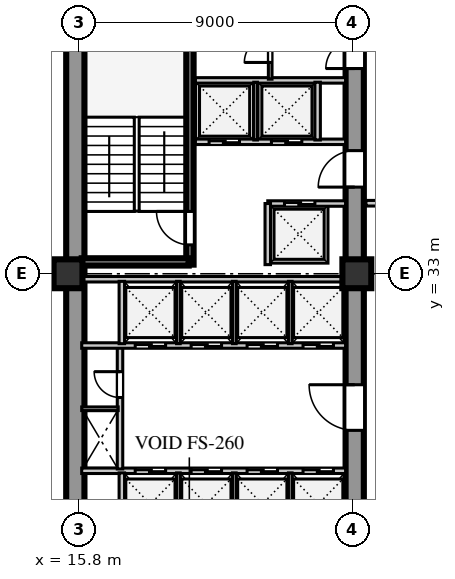
"""IFC4 building model, lengths in metres.
Left out: names, types, materials, properties, quantities, classifications, styles, units other than length and angle.
Written with IfcOpenShell. Run it as: python <this file> out.ifc"""

import sys

from ifc_helpers import new_model, si_unit, direction, frame, frame_2d, origin, origin_2d, place, context, subcontext, project, spatial, rectangle, extrude, element, fill, save


model = new_model("IFC4")
c1 = context("Model", 3, precision=1e-05, world=origin(), true_north=direction((0.0, 1.0)))
c2 = subcontext(c1, "Body", "Model", "MODEL_VIEW")
j1 = project(units=[si_unit("LENGTHUNIT", "METRE"), si_unit("PLANEANGLEUNIT", "RADIAN")], contexts=[c1])
p1 = place(None, origin())
s1 = spatial("IfcSite", under=j1, at=p1, CompositionType="ELEMENT")
p2 = place(p1, origin())
s2 = spatial("IfcBuilding", under=s1, at=p2, CompositionType="ELEMENT")
p3 = place(p2, frame((0.0, 0.0, 82.0)))
s3 = spatial("IfcBuildingStorey", under=s2, at=p3, CompositionType="ELEMENT", Elevation=82.0)
p4 = place(p3, frame((15.69, 15.81, 0.0), z_axis=(0.0, 0.0, 1.0), x_axis=(0.0, 1.0, 0.0)))
e1 = element("IfcWall", 1, at=p4, inside=s3, PredefinedType="SHEAR", context=c2, shape_type="SweptSolid", body=[
    extrude(rectangle(XDim=25.63, YDim=0.6, at=frame_2d((12.815, 0.0))), origin(), (0.0, 0.0, 1.0), 3.74),
])
p5 = place(p3, frame((24.88, 15.74, 0.0), z_axis=(0.0, 0.0, 1.0), x_axis=(0.0, 1.0, 0.0)))
e2 = element("IfcWall", 2, at=p5, inside=s3, PredefinedType="SHEAR", context=c2, shape_type="SweptSolid", body=[
    extrude(rectangle(XDim=25.76, YDim=0.6, at=frame_2d((12.88, 0.0))), origin(), (0.0, 0.0, 1.0), 3.74),
])
p6 = place(p5, frame((1.61, 0.0, 0.0)))
e3 = element("IfcOpeningElement", 3, at=p6, cuts=e2, PredefinedType="OPENING", context=c2, shape_type="SweptSolid", body=[
    extrude(rectangle(XDim=1.2, YDim=2.1, at=frame_2d((0.6, 1.05))), frame((0.0, 0.31, 0.0), z_axis=(0.0, -1.0, 0.0), x_axis=(1.0, 0.0, 0.0)), (0.0, 0.0, 1.0), 0.62),
])
p7 = place(p5, frame((6.78, 0.0, 0.0)))
e4 = element("IfcOpeningElement", 4, at=p7, cuts=e2, PredefinedType="OPENING", context=c2, shape_type="SweptSolid", body=[
    extrude(rectangle(XDim=0.85, YDim=2.06, at=frame_2d((0.425, 1.03))), frame((0.0, 0.31, 0.0), z_axis=(0.0, -1.0, 0.0), x_axis=(1.0, 0.0, 0.0)), (0.0, 0.0, 1.0), 0.62),
])
p8 = place(p5, frame((12.11, 0.0, 0.0)))
e5 = element("IfcOpeningElement", 5, at=p8, cuts=e2, PredefinedType="OPENING", context=c2, shape_type="SweptSolid", body=[
    extrude(rectangle(XDim=1.5, YDim=2.12, at=frame_2d((0.75, 1.06))), frame((0.0, 0.31, 0.0), z_axis=(0.0, -1.0, 0.0), x_axis=(1.0, 0.0, 0.0)), (0.0, 0.0, 1.0), 0.62),
])
p9 = place(p5, frame((20.11, 0.0, 0.0)))
e6 = element("IfcOpeningElement", 6, at=p9, cuts=e2, PredefinedType="OPENING", context=c2, shape_type="SweptSolid", body=[
    extrude(rectangle(XDim=1.2, YDim=2.12, at=frame_2d((0.6, 1.06))), frame((0.0, 0.31, 0.0), z_axis=(0.0, -1.0, 0.0), x_axis=(1.0, 0.0, 0.0)), (0.0, 0.0, 1.0), 0.62),
])
p10 = place(p5, frame((24.01, 0.0, 0.0)))
e7 = element("IfcOpeningElement", 7, at=p10, cuts=e2, PredefinedType="OPENING", context=c2, shape_type="SweptSolid", body=[
    extrude(rectangle(XDim=0.95, YDim=2.1, at=frame_2d((0.475, 1.05))), frame((0.0, 0.31, 0.0), z_axis=(0.0, -1.0, 0.0), x_axis=(1.0, 0.0, 0.0)), (0.0, 0.0, 1.0), 0.62),
])
for number, where, z_axis, x_axis in (
    (8, (15.45, 33.0, 0.0), (0.0, 0.0, 1.0), (1.0, 0.0, 0.0)),
    (9, (24.95, 33.0, 0.0), (0.0, 0.0, 1.0), (1.0, 0.0, 0.0)),
):
    element("IfcColumn", number, at=place(p3, frame(where, z_axis=z_axis, x_axis=x_axis)), inside=s3, PredefinedType="COLUMN", context=c2, shape_type="SweptSolid", body=[
        extrude(rectangle(XDim=0.95, YDim=0.95, at=origin_2d()), origin(), (0.0, 0.0, 1.0), 3.74),
    ])
p11 = place(p3, frame((15.9, 26.52, 0.0), z_axis=(0.0, 0.0, 1.0), x_axis=(1.0, 0.0, 0.0)))
e10 = element("IfcWall", 10, at=p11, inside=s3, PredefinedType="SOLIDWALL", context=c2, shape_type="SweptSolid", body=[
    extrude(rectangle(XDim=8.68, YDim=0.18, at=frame_2d((4.34, 0.0))), origin(), (0.0, 0.0, 1.0), 3.74),
])
p12 = place(p11, frame((1.76, 0.0, 0.0)))
e11 = element("IfcOpeningElement", 11, at=p12, cuts=e10, PredefinedType="OPENING", context=c2, shape_type="SweptSolid", body=[
    extrude(rectangle(XDim=1.0, YDim=2.1, at=frame_2d((0.5, 1.05))), frame((0.0, 0.1, 0.0), z_axis=(0.0, -1.0, 0.0), x_axis=(1.0, 0.0, 0.0)), (0.0, 0.0, 1.0), 0.2),
])
p13 = place(p11, frame((3.6, 0.0, 0.0)))
e12 = element("IfcOpeningElement", 12, at=p13, cuts=e10, PredefinedType="OPENING", context=c2, shape_type="SweptSolid", body=[
    extrude(rectangle(XDim=1.0, YDim=2.1, at=frame_2d((0.5, 1.05))), frame((0.0, 0.1, 0.0), z_axis=(0.0, -1.0, 0.0), x_axis=(1.0, 0.0, 0.0)), (0.0, 0.0, 1.0), 0.2),
])
p14 = place(p11, frame((5.44, 0.0, 0.0)))
e13 = element("IfcOpeningElement", 13, at=p14, cuts=e10, PredefinedType="OPENING", context=c2, shape_type="SweptSolid", body=[
    extrude(rectangle(XDim=1.0, YDim=2.1, at=frame_2d((0.5, 1.05))), frame((0.0, 0.1, 0.0), z_axis=(0.0, -1.0, 0.0), x_axis=(1.0, 0.0, 0.0)), (0.0, 0.0, 1.0), 0.2),
])
p15 = place(p11, frame((7.28, 0.0, 0.0)))
e14 = element("IfcOpeningElement", 14, at=p15, cuts=e10, PredefinedType="OPENING", context=c2, shape_type="SweptSolid", body=[
    extrude(rectangle(XDim=1.0, YDim=2.1, at=frame_2d((0.5, 1.05))), frame((0.0, 0.1, 0.0), z_axis=(0.0, -1.0, 0.0), x_axis=(1.0, 0.0, 0.0)), (0.0, 0.0, 1.0), 0.2),
])
p16 = place(p3, frame((17.22, 24.4, 0.0), z_axis=(0.0, 0.0, 1.0), x_axis=(0.0, 1.0, 0.0)))
e15 = element("IfcWall", 15, at=p16, inside=s3, PredefinedType="SOLIDWALL", context=c2, shape_type="SweptSolid", body=[
    extrude(rectangle(XDim=2.05, YDim=0.18, at=frame_2d((1.025, 0.0))), origin(), (0.0, 0.0, 1.0), 3.74),
])
for number, where, z_axis, x_axis in (
    (16, (19.08, 24.4, 0.0), (0.0, 0.0, 1.0), (0.0, 1.0, 0.0)),
    (17, (20.92, 24.4, 0.0), (0.0, 0.0, 1.0), (0.0, 1.0, 0.0)),
    (18, (22.76, 24.4, 0.0), (0.0, 0.0, 1.0), (0.0, 1.0, 0.0)),
):
    element("IfcWall", number, at=place(p3, frame(where, z_axis=z_axis, x_axis=x_axis)), inside=s3, PredefinedType="PARTITIONING", context=c2, shape_type="SweptSolid", body=[
        extrude(rectangle(XDim=2.05, YDim=0.12, at=frame_2d((1.025, 0.0))), origin(), (0.0, 0.0, 1.0), 3.74),
    ])
p17 = place(p3, frame((17.16, 26.58, 0.0), z_axis=(0.0, 0.0, 1.0), x_axis=(0.0, 1.0, 0.0)))
e19 = element("IfcWall", 19, at=p17, inside=s3, PredefinedType="SOLIDWALL", context=c2, shape_type="SweptSolid", body=[
    extrude(rectangle(XDim=4.02, YDim=0.18, at=frame_2d((2.01, 0.0))), origin(), (0.0, 0.0, 1.0), 3.74),
])
p18 = place(p17, frame((2.35, 0.0, 0.0)))
e20 = element("IfcOpeningElement", 20, at=p18, cuts=e19, PredefinedType="OPENING", context=c2, shape_type="SweptSolid", body=[
    extrude(rectangle(XDim=0.85, YDim=2.06, at=frame_2d((0.425, 1.03))), frame((0.0, 0.1, 0.0), z_axis=(0.0, -1.0, 0.0), x_axis=(1.0, 0.0, 0.0)), (0.0, 0.0, 1.0), 0.2),
])
p19 = place(p3, frame((15.9, 28.56, 0.0), z_axis=(0.0, 0.0, 1.0), x_axis=(1.0, 0.0, 0.0)))
e21 = element("IfcWall", 21, at=p19, inside=s3, PredefinedType="PARTITIONING", context=c2, shape_type="SweptSolid", body=[
    extrude(rectangle(XDim=1.2, YDim=0.12, at=frame_2d((0.6, 0.0))), origin(), (0.0, 0.0, 1.0), 3.74),
])
p20 = place(p3, frame((15.9, 30.64, 0.0), z_axis=(0.0, 0.0, 1.0), x_axis=(1.0, 0.0, 0.0)))
e22 = element("IfcWall", 22, at=p20, inside=s3, PredefinedType="SOLIDWALL", context=c2, shape_type="SweptSolid", body=[
    extrude(rectangle(XDim=8.68, YDim=0.18, at=frame_2d((4.34, 0.0))), origin(), (0.0, 0.0, 1.0), 3.74),
])
p21 = place(p20, frame((1.76, 0.0, 0.0)))
e23 = element("IfcOpeningElement", 23, at=p21, cuts=e22, PredefinedType="OPENING", context=c2, shape_type="SweptSolid", body=[
    extrude(rectangle(XDim=1.0, YDim=2.1, at=frame_2d((0.5, 1.05))), frame((0.0, 0.1, 0.0), z_axis=(0.0, -1.0, 0.0), x_axis=(1.0, 0.0, 0.0)), (0.0, 0.0, 1.0), 0.2),
])
p22 = place(p20, frame((3.6, 0.0, 0.0)))
e24 = element("IfcOpeningElement", 24, at=p22, cuts=e22, PredefinedType="OPENING", context=c2, shape_type="SweptSolid", body=[
    extrude(rectangle(XDim=1.0, YDim=2.1, at=frame_2d((0.5, 1.05))), frame((0.0, 0.1, 0.0), z_axis=(0.0, -1.0, 0.0), x_axis=(1.0, 0.0, 0.0)), (0.0, 0.0, 1.0), 0.2),
])
p23 = place(p20, frame((5.44, 0.0, 0.0)))
e25 = element("IfcOpeningElement", 25, at=p23, cuts=e22, PredefinedType="OPENING", context=c2, shape_type="SweptSolid", body=[
    extrude(rectangle(XDim=1.0, YDim=2.1, at=frame_2d((0.5, 1.05))), frame((0.0, 0.1, 0.0), z_axis=(0.0, -1.0, 0.0), x_axis=(1.0, 0.0, 0.0)), (0.0, 0.0, 1.0), 0.2),
])
p24 = place(p20, frame((7.28, 0.0, 0.0)))
e26 = element("IfcOpeningElement", 26, at=p24, cuts=e22, PredefinedType="OPENING", context=c2, shape_type="SweptSolid", body=[
    extrude(rectangle(XDim=1.0, YDim=2.1, at=frame_2d((0.5, 1.05))), frame((0.0, 0.1, 0.0), z_axis=(0.0, -1.0, 0.0), x_axis=(1.0, 0.0, 0.0)), (0.0, 0.0, 1.0), 0.2),
])
p25 = place(p3, frame((15.9, 32.82, 0.0), z_axis=(0.0, 0.0, 1.0), x_axis=(1.0, 0.0, 0.0)))
e27 = element("IfcWall", 27, at=p25, inside=s3, PredefinedType="SOLIDWALL", context=c2, shape_type="SweptSolid", body=[
    extrude(rectangle(XDim=8.68, YDim=0.18, at=frame_2d((4.34, 0.0))), origin(), (0.0, 0.0, 1.0), 3.04),
])
p26 = place(p3, frame((17.22, 30.7, 0.0), z_axis=(0.0, 0.0, 1.0), x_axis=(0.0, 1.0, 0.0)))
e28 = element("IfcWall", 28, at=p26, inside=s3, PredefinedType="SOLIDWALL", context=c2, shape_type="SweptSolid", body=[
    extrude(rectangle(XDim=2.05, YDim=0.18, at=frame_2d((1.025, 0.0))), origin(), (0.0, 0.0, 1.0), 3.74),
])
for number, where, z_axis, x_axis in (
    (29, (19.08, 30.7, 0.0), (0.0, 0.0, 1.0), (0.0, 1.0, 0.0)),
    (30, (20.92, 30.7, 0.0), (0.0, 0.0, 1.0), (0.0, 1.0, 0.0)),
    (31, (22.76, 30.7, 0.0), (0.0, 0.0, 1.0), (0.0, 1.0, 0.0)),
):
    element("IfcWall", number, at=place(p3, frame(where, z_axis=z_axis, x_axis=x_axis)), inside=s3, PredefinedType="PARTITIONING", context=c2, shape_type="SweptSolid", body=[
        extrude(rectangle(XDim=2.05, YDim=0.12, at=frame_2d((1.025, 0.0))), origin(), (0.0, 0.0, 1.0), 3.74),
    ])
p27 = place(p3, frame((19.46, 33.3, 0.0), z_axis=(0.0, 0.0, 1.0), x_axis=(0.0, 1.0, 0.0)))
e32 = element("IfcWall", 32, at=p27, inside=s3, PredefinedType="SHEAR", context=c2, shape_type="SweptSolid", body=[
    extrude(rectangle(XDim=8.18, YDim=0.24, at=frame_2d((4.09, 0.0))), origin(), (0.0, 0.0, 1.0), 4.0),
])
p28 = place(p27, frame((0.65, 0.0, 0.0)))
e33 = element("IfcOpeningElement", 33, at=p28, cuts=e32, PredefinedType="OPENING", context=c2, shape_type="SweptSolid", body=[
    extrude(rectangle(XDim=1.1, YDim=2.1, at=frame_2d((0.55, 1.05))), frame((0.0, 0.13, 0.0), z_axis=(0.0, -1.0, 0.0), x_axis=(1.0, 0.0, 0.0)), (0.0, 0.0, 1.0), 0.26),
])
p29 = place(p3, frame((15.9, 33.39, 0.0), z_axis=(0.0, 0.0, 1.0), x_axis=(1.0, 0.0, 0.0)))
e34 = element("IfcWall", 34, at=p29, inside=s3, PredefinedType="SHEAR", context=c2, shape_type="SweptSolid", body=[
    extrude(rectangle(XDim=3.52, YDim=0.24, at=frame_2d((1.76, 0.0))), origin(), (0.0, 0.0, 1.0), 4.0),
])
p30 = place(p3, frame((22.02, 35.31, 0.0), z_axis=(0.0, 0.0, 1.0), x_axis=(1.0, 0.0, 0.0)))
e35 = element("IfcWall", 35, at=p30, inside=s3, PredefinedType="SOLIDWALL", context=c2, shape_type="SweptSolid", body=[
    extrude(rectangle(XDim=2.56, YDim=0.18, at=frame_2d((1.28, 0.0))), origin(), (0.0, 0.0, 1.0), 3.74),
])
p31 = place(p30, frame((0.55, 0.0, 0.0)))
e36 = element("IfcOpeningElement", 36, at=p31, cuts=e35, PredefinedType="OPENING", context=c2, shape_type="SweptSolid", body=[
    extrude(rectangle(XDim=1.0, YDim=2.1, at=frame_2d((0.5, 1.05))), frame((0.0, 0.1, 0.0), z_axis=(0.0, -1.0, 0.0), x_axis=(1.0, 0.0, 0.0)), (0.0, 0.0, 1.0), 0.2),
])
p32 = place(p3, frame((22.02, 33.3, 0.0), z_axis=(0.0, 0.0, 1.0), x_axis=(0.0, 1.0, 0.0)))
e37 = element("IfcWall", 37, at=p32, inside=s3, PredefinedType="SOLIDWALL", context=c2, shape_type="SweptSolid", body=[
    extrude(rectangle(XDim=2.01, YDim=0.18, at=frame_2d((1.005, 0.0))), origin(), (0.0, 0.0, 1.0), 3.74),
])
p33 = place(p3, frame((19.64, 37.34, 0.0), z_axis=(0.0, 0.0, 1.0), x_axis=(1.0, 0.0, 0.0)))
e38 = element("IfcWall", 38, at=p33, inside=s3, PredefinedType="SOLIDWALL", context=c2, shape_type="SweptSolid", body=[
    extrude(rectangle(XDim=4.94, YDim=0.18, at=frame_2d((2.47, 0.0))), origin(), (0.0, 0.0, 1.0), 3.74),
])
p34 = place(p33, frame((0.45, 0.0, 0.0)))
e39 = element("IfcOpeningElement", 39, at=p34, cuts=e38, PredefinedType="OPENING", context=c2, shape_type="SweptSolid", body=[
    extrude(rectangle(XDim=1.0, YDim=2.1, at=frame_2d((0.5, 1.05))), frame((0.0, 0.1, 0.0), z_axis=(0.0, -1.0, 0.0), x_axis=(1.0, 0.0, 0.0)), (0.0, 0.0, 1.0), 0.2),
])
p35 = place(p33, frame((2.5, 0.0, 0.0)))
e40 = element("IfcOpeningElement", 40, at=p35, cuts=e38, PredefinedType="OPENING", context=c2, shape_type="SweptSolid", body=[
    extrude(rectangle(XDim=1.0, YDim=2.1, at=frame_2d((0.5, 1.05))), frame((0.0, 0.1, 0.0), z_axis=(0.0, -1.0, 0.0), x_axis=(1.0, 0.0, 0.0)), (0.0, 0.0, 1.0), 0.2),
])
p36 = place(p3, frame((19.64, 39.36, 0.0), z_axis=(0.0, 0.0, 1.0), x_axis=(1.0, 0.0, 0.0)))
e41 = element("IfcWall", 41, at=p36, inside=s3, PredefinedType="SOLIDWALL", context=c2, shape_type="SweptSolid", body=[
    extrude(rectangle(XDim=4.94, YDim=0.18, at=frame_2d((2.47, 0.0))), origin(), (0.0, 0.0, 1.0), 3.74),
])
p37 = place(p3, frame((21.62, 37.4, 0.0), z_axis=(0.0, 0.0, 1.0), x_axis=(0.0, 1.0, 0.0)))
e42 = element("IfcWall", 42, at=p37, inside=s3, PredefinedType="PARTITIONING", context=c2, shape_type="SweptSolid", body=[
    extrude(rectangle(XDim=1.9, YDim=0.12, at=frame_2d((0.95, 0.0))), origin(), (0.0, 0.0, 1.0), 3.74),
])
p38 = place(p3, frame((23.66, 37.4, 0.0), z_axis=(0.0, 0.0, 1.0), x_axis=(0.0, 1.0, 0.0)))
e43 = element("IfcWall", 43, at=p38, inside=s3, PredefinedType="SOLIDWALL", context=c2, shape_type="SweptSolid", body=[
    extrude(rectangle(XDim=1.9, YDim=0.18, at=frame_2d((0.95, 0.0))), origin(), (0.0, 0.0, 1.0), 3.74),
])
p39 = place(p3, frame((22.1, 39.4, 0.0), z_axis=(0.0, 0.0, 1.0), x_axis=(0.0, 1.0, 0.0)))
e44 = element("IfcWall", 44, at=p39, inside=s3, PredefinedType="PARTITIONING", context=c2, shape_type="SweptSolid", body=[
    extrude(rectangle(XDim=2.08, YDim=0.12, at=frame_2d((1.04, 0.0))), origin(), (0.0, 0.0, 1.0), 3.74),
])
p40 = place(p39, frame((0.55, 0.0, 0.0)))
e45 = element("IfcOpeningElement", 45, at=p40, cuts=e44, PredefinedType="OPENING", context=c2, shape_type="SweptSolid", body=[
    extrude(rectangle(XDim=0.85, YDim=2.06, at=frame_2d((0.425, 1.03))), frame((0.0, 0.07, 0.0), z_axis=(0.0, -1.0, 0.0), x_axis=(1.0, 0.0, 0.0)), (0.0, 0.0, 1.0), 0.14),
])
p41 = place(p3, frame((25.25, 35.32, 0.0), z_axis=(0.0, 0.0, 1.0), x_axis=(1.0, 0.0, 0.0)))
e46 = element("IfcWall", 46, at=p41, inside=s3, PredefinedType="SOLIDWALL", context=c2, shape_type="SweptSolid", body=[
    extrude(rectangle(XDim=9.47, YDim=0.185, at=frame_2d((4.735, 0.0))), origin(), (0.0, 0.0, 1.0), 3.74),
])
p42 = place(p41, frame((0.825, 0.0, 0.0)))
e47 = element("IfcOpeningElement", 47, at=p42, cuts=e46, PredefinedType="OPENING", context=c2, shape_type="SweptSolid", body=[
    extrude(rectangle(XDim=0.95, YDim=2.08, at=frame_2d((0.475, 1.04))), frame((0.0, 0.103, 0.0), z_axis=(0.0, -1.0, 0.0), x_axis=(1.0, 0.0, 0.0)), (0.0, 0.0, 1.0), 0.205),
])
p43 = place(p41, frame((3.775, 0.0, 0.0)))
e48 = element("IfcOpeningElement", 48, at=p43, cuts=e46, PredefinedType="OPENING", context=c2, shape_type="SweptSolid", body=[
    extrude(rectangle(XDim=0.95, YDim=2.08, at=frame_2d((0.475, 1.04))), frame((0.0, 0.103, 0.0), z_axis=(0.0, -1.0, 0.0), x_axis=(1.0, 0.0, 0.0)), (0.0, 0.0, 1.0), 0.205),
])
p44 = place(p41, frame((7.215, 0.0, 0.0)))
e49 = element("IfcOpeningElement", 49, at=p44, cuts=e46, PredefinedType="OPENING", context=c2, shape_type="SweptSolid", body=[
    extrude(rectangle(XDim=0.95, YDim=2.08, at=frame_2d((0.475, 1.04))), frame((0.0, 0.103, 0.0), z_axis=(0.0, -1.0, 0.0), x_axis=(1.0, 0.0, 0.0)), (0.0, 0.0, 1.0), 0.205),
])
p45 = place(p12, origin())
e50 = element("IfcDoor", 50, at=p45, inside=s3, OperationType="DOUBLE_DOOR_SLIDING", PredefinedType="DOOR", context=c2, shape_type="SweptSolid", body=[
    extrude(rectangle(XDim=1.0, YDim=2.1, at=frame_2d((0.5, 1.05))), frame((0.0, 0.025, 0.0), z_axis=(0.0, -1.0, 0.0), x_axis=(1.0, 0.0, 0.0)), (0.0, 0.0, 1.0), 0.05),
])
fill(e11, e50)
p46 = place(p13, origin())
e51 = element("IfcDoor", 51, at=p46, inside=s3, OperationType="DOUBLE_DOOR_SLIDING", PredefinedType="DOOR", context=c2, shape_type="SweptSolid", body=[
    extrude(rectangle(XDim=1.0, YDim=2.1, at=frame_2d((0.5, 1.05))), frame((0.0, 0.025, 0.0), z_axis=(0.0, -1.0, 0.0), x_axis=(1.0, 0.0, 0.0)), (0.0, 0.0, 1.0), 0.05),
])
fill(e12, e51)
p47 = place(p14, origin())
e52 = element("IfcDoor", 52, at=p47, inside=s3, OperationType="DOUBLE_DOOR_SLIDING", PredefinedType="DOOR", context=c2, shape_type="SweptSolid", body=[
    extrude(rectangle(XDim=1.0, YDim=2.1, at=frame_2d((0.5, 1.05))), frame((0.0, 0.025, 0.0), z_axis=(0.0, -1.0, 0.0), x_axis=(1.0, 0.0, 0.0)), (0.0, 0.0, 1.0), 0.05),
])
fill(e13, e52)
p48 = place(p15, origin())
e53 = element("IfcDoor", 53, at=p48, inside=s3, OperationType="DOUBLE_DOOR_SLIDING", PredefinedType="DOOR", context=c2, shape_type="SweptSolid", body=[
    extrude(rectangle(XDim=1.0, YDim=2.1, at=frame_2d((0.5, 1.05))), frame((0.0, 0.025, 0.0), z_axis=(0.0, -1.0, 0.0), x_axis=(1.0, 0.0, 0.0)), (0.0, 0.0, 1.0), 0.05),
])
fill(e14, e53)
p49 = place(p18, origin())
e54 = element("IfcDoor", 54, at=p49, inside=s3, OperationType="SINGLE_SWING_RIGHT", PredefinedType="DOOR", context=c2, shape_type="SweptSolid", body=[
    extrude(rectangle(XDim=0.85, YDim=2.06, at=frame_2d((0.425, 1.03))), frame((0.0, 0.025, 0.0), z_axis=(0.0, -1.0, 0.0), x_axis=(1.0, 0.0, 0.0)), (0.0, 0.0, 1.0), 0.05),
])
fill(e20, e54)
p50 = place(p8, frame((1.5, 0.0, 0.0), z_axis=(0.0, 0.0, 1.0), x_axis=(-1.0, 0.0, 0.0)))
e55 = element("IfcDoor", 55, at=p50, inside=s3, OperationType="SINGLE_SWING_LEFT", PredefinedType="DOOR", context=c2, shape_type="SweptSolid", body=[
    extrude(rectangle(XDim=1.5, YDim=2.12, at=frame_2d((0.75, 1.06))), frame((0.0, 0.025, 0.0), z_axis=(0.0, -1.0, 0.0), x_axis=(1.0, 0.0, 0.0)), (0.0, 0.0, 1.0), 0.05),
])
fill(e5, e55)
p51 = place(p21, frame((1.0, 0.0, 0.0), z_axis=(0.0, 0.0, 1.0), x_axis=(-1.0, 0.0, 0.0)))
e56 = element("IfcDoor", 56, at=p51, inside=s3, OperationType="DOUBLE_DOOR_SLIDING", PredefinedType="DOOR", context=c2, shape_type="SweptSolid", body=[
    extrude(rectangle(XDim=1.0, YDim=2.1, at=frame_2d((0.5, 1.05))), frame((0.0, 0.025, 0.0), z_axis=(0.0, -1.0, 0.0), x_axis=(1.0, 0.0, 0.0)), (0.0, 0.0, 1.0), 0.05),
])
fill(e23, e56)
p52 = place(p22, frame((1.0, 0.0, 0.0), z_axis=(0.0, 0.0, 1.0), x_axis=(-1.0, 0.0, 0.0)))
e57 = element("IfcDoor", 57, at=p52, inside=s3, OperationType="DOUBLE_DOOR_SLIDING", PredefinedType="DOOR", context=c2, shape_type="SweptSolid", body=[
    extrude(rectangle(XDim=1.0, YDim=2.1, at=frame_2d((0.5, 1.05))), frame((0.0, 0.025, 0.0), z_axis=(0.0, -1.0, 0.0), x_axis=(1.0, 0.0, 0.0)), (0.0, 0.0, 1.0), 0.05),
])
fill(e24, e57)
p53 = place(p23, frame((1.0, 0.0, 0.0), z_axis=(0.0, 0.0, 1.0), x_axis=(-1.0, 0.0, 0.0)))
e58 = element("IfcDoor", 58, at=p53, inside=s3, OperationType="DOUBLE_DOOR_SLIDING", PredefinedType="DOOR", context=c2, shape_type="SweptSolid", body=[
    extrude(rectangle(XDim=1.0, YDim=2.1, at=frame_2d((0.5, 1.05))), frame((0.0, 0.025, 0.0), z_axis=(0.0, -1.0, 0.0), x_axis=(1.0, 0.0, 0.0)), (0.0, 0.0, 1.0), 0.05),
])
fill(e25, e58)
p54 = place(p24, frame((1.0, 0.0, 0.0), z_axis=(0.0, 0.0, 1.0), x_axis=(-1.0, 0.0, 0.0)))
e59 = element("IfcDoor", 59, at=p54, inside=s3, OperationType="DOUBLE_DOOR_SLIDING", PredefinedType="DOOR", context=c2, shape_type="SweptSolid", body=[
    extrude(rectangle(XDim=1.0, YDim=2.1, at=frame_2d((0.5, 1.05))), frame((0.0, 0.025, 0.0), z_axis=(0.0, -1.0, 0.0), x_axis=(1.0, 0.0, 0.0)), (0.0, 0.0, 1.0), 0.05),
])
fill(e26, e59)
p55 = place(p28, origin())
e60 = element("IfcDoor", 60, at=p55, inside=s3, OperationType="SINGLE_SWING_RIGHT", PredefinedType="DOOR", context=c2, shape_type="SweptSolid", body=[
    extrude(rectangle(XDim=1.1, YDim=2.1, at=frame_2d((0.55, 1.05))), frame((0.0, 0.025, 0.0), z_axis=(0.0, -1.0, 0.0), x_axis=(1.0, 0.0, 0.0)), (0.0, 0.0, 1.0), 0.05),
])
fill(e33, e60)
p56 = place(p9, frame((1.2, 0.0, 0.0), z_axis=(0.0, 0.0, 1.0), x_axis=(-1.0, 0.0, 0.0)))
e61 = element("IfcDoor", 61, at=p56, inside=s3, OperationType="SINGLE_SWING_RIGHT", PredefinedType="DOOR", context=c2, shape_type="SweptSolid", body=[
    extrude(rectangle(XDim=1.2, YDim=2.12, at=frame_2d((0.6, 1.06))), frame((0.0, 0.025, 0.0), z_axis=(0.0, -1.0, 0.0), x_axis=(1.0, 0.0, 0.0)), (0.0, 0.0, 1.0), 0.05),
])
fill(e6, e61)
p57 = place(p34, frame((1.0, 0.0, 0.0), z_axis=(0.0, 0.0, 1.0), x_axis=(-1.0, 0.0, 0.0)))
e62 = element("IfcDoor", 62, at=p57, inside=s3, OperationType="DOUBLE_DOOR_SLIDING", PredefinedType="DOOR", context=c2, shape_type="SweptSolid", body=[
    extrude(rectangle(XDim=1.0, YDim=2.1, at=frame_2d((0.5, 1.05))), frame((0.0, 0.025, 0.0), z_axis=(0.0, -1.0, 0.0), x_axis=(1.0, 0.0, 0.0)), (0.0, 0.0, 1.0), 0.05),
])
fill(e39, e62)
p58 = place(p35, frame((1.0, 0.0, 0.0), z_axis=(0.0, 0.0, 1.0), x_axis=(-1.0, 0.0, 0.0)))
e63 = element("IfcDoor", 63, at=p58, inside=s3, OperationType="DOUBLE_DOOR_SLIDING", PredefinedType="DOOR", context=c2, shape_type="SweptSolid", body=[
    extrude(rectangle(XDim=1.0, YDim=2.1, at=frame_2d((0.5, 1.05))), frame((0.0, 0.025, 0.0), z_axis=(0.0, -1.0, 0.0), x_axis=(1.0, 0.0, 0.0)), (0.0, 0.0, 1.0), 0.05),
])
fill(e40, e63)
p59 = place(p31, origin())
e64 = element("IfcDoor", 64, at=p59, inside=s3, OperationType="DOUBLE_DOOR_SLIDING", PredefinedType="DOOR", context=c2, shape_type="SweptSolid", body=[
    extrude(rectangle(XDim=1.0, YDim=2.1, at=frame_2d((0.5, 1.05))), frame((0.0, 0.025, 0.0), z_axis=(0.0, -1.0, 0.0), x_axis=(1.0, 0.0, 0.0)), (0.0, 0.0, 1.0), 0.05),
])
fill(e36, e64)
p60 = place(p40, origin())
e65 = element("IfcDoor", 65, at=p60, inside=s3, OperationType="SINGLE_SWING_LEFT", PredefinedType="DOOR", context=c2, shape_type="SweptSolid", body=[
    extrude(rectangle(XDim=0.85, YDim=2.06, at=frame_2d((0.425, 1.03))), frame((0.0, 0.025, 0.0), z_axis=(0.0, -1.0, 0.0), x_axis=(1.0, 0.0, 0.0)), (0.0, 0.0, 1.0), 0.05),
])
fill(e45, e65)
p61 = place(p10, frame((0.95, 0.0, 0.0), z_axis=(0.0, 0.0, 1.0), x_axis=(-1.0, 0.0, 0.0)))
e66 = element("IfcDoor", 66, at=p61, inside=s3, OperationType="SINGLE_SWING_RIGHT", PredefinedType="DOOR", context=c2, shape_type="SweptSolid", body=[
    extrude(rectangle(XDim=0.95, YDim=2.1, at=frame_2d((0.475, 1.05))), frame((0.0, 0.025, 0.0), z_axis=(0.0, -1.0, 0.0), x_axis=(1.0, 0.0, 0.0)), (0.0, 0.0, 1.0), 0.05),
])
fill(e7, e66)
save(model, sys.argv[1])
